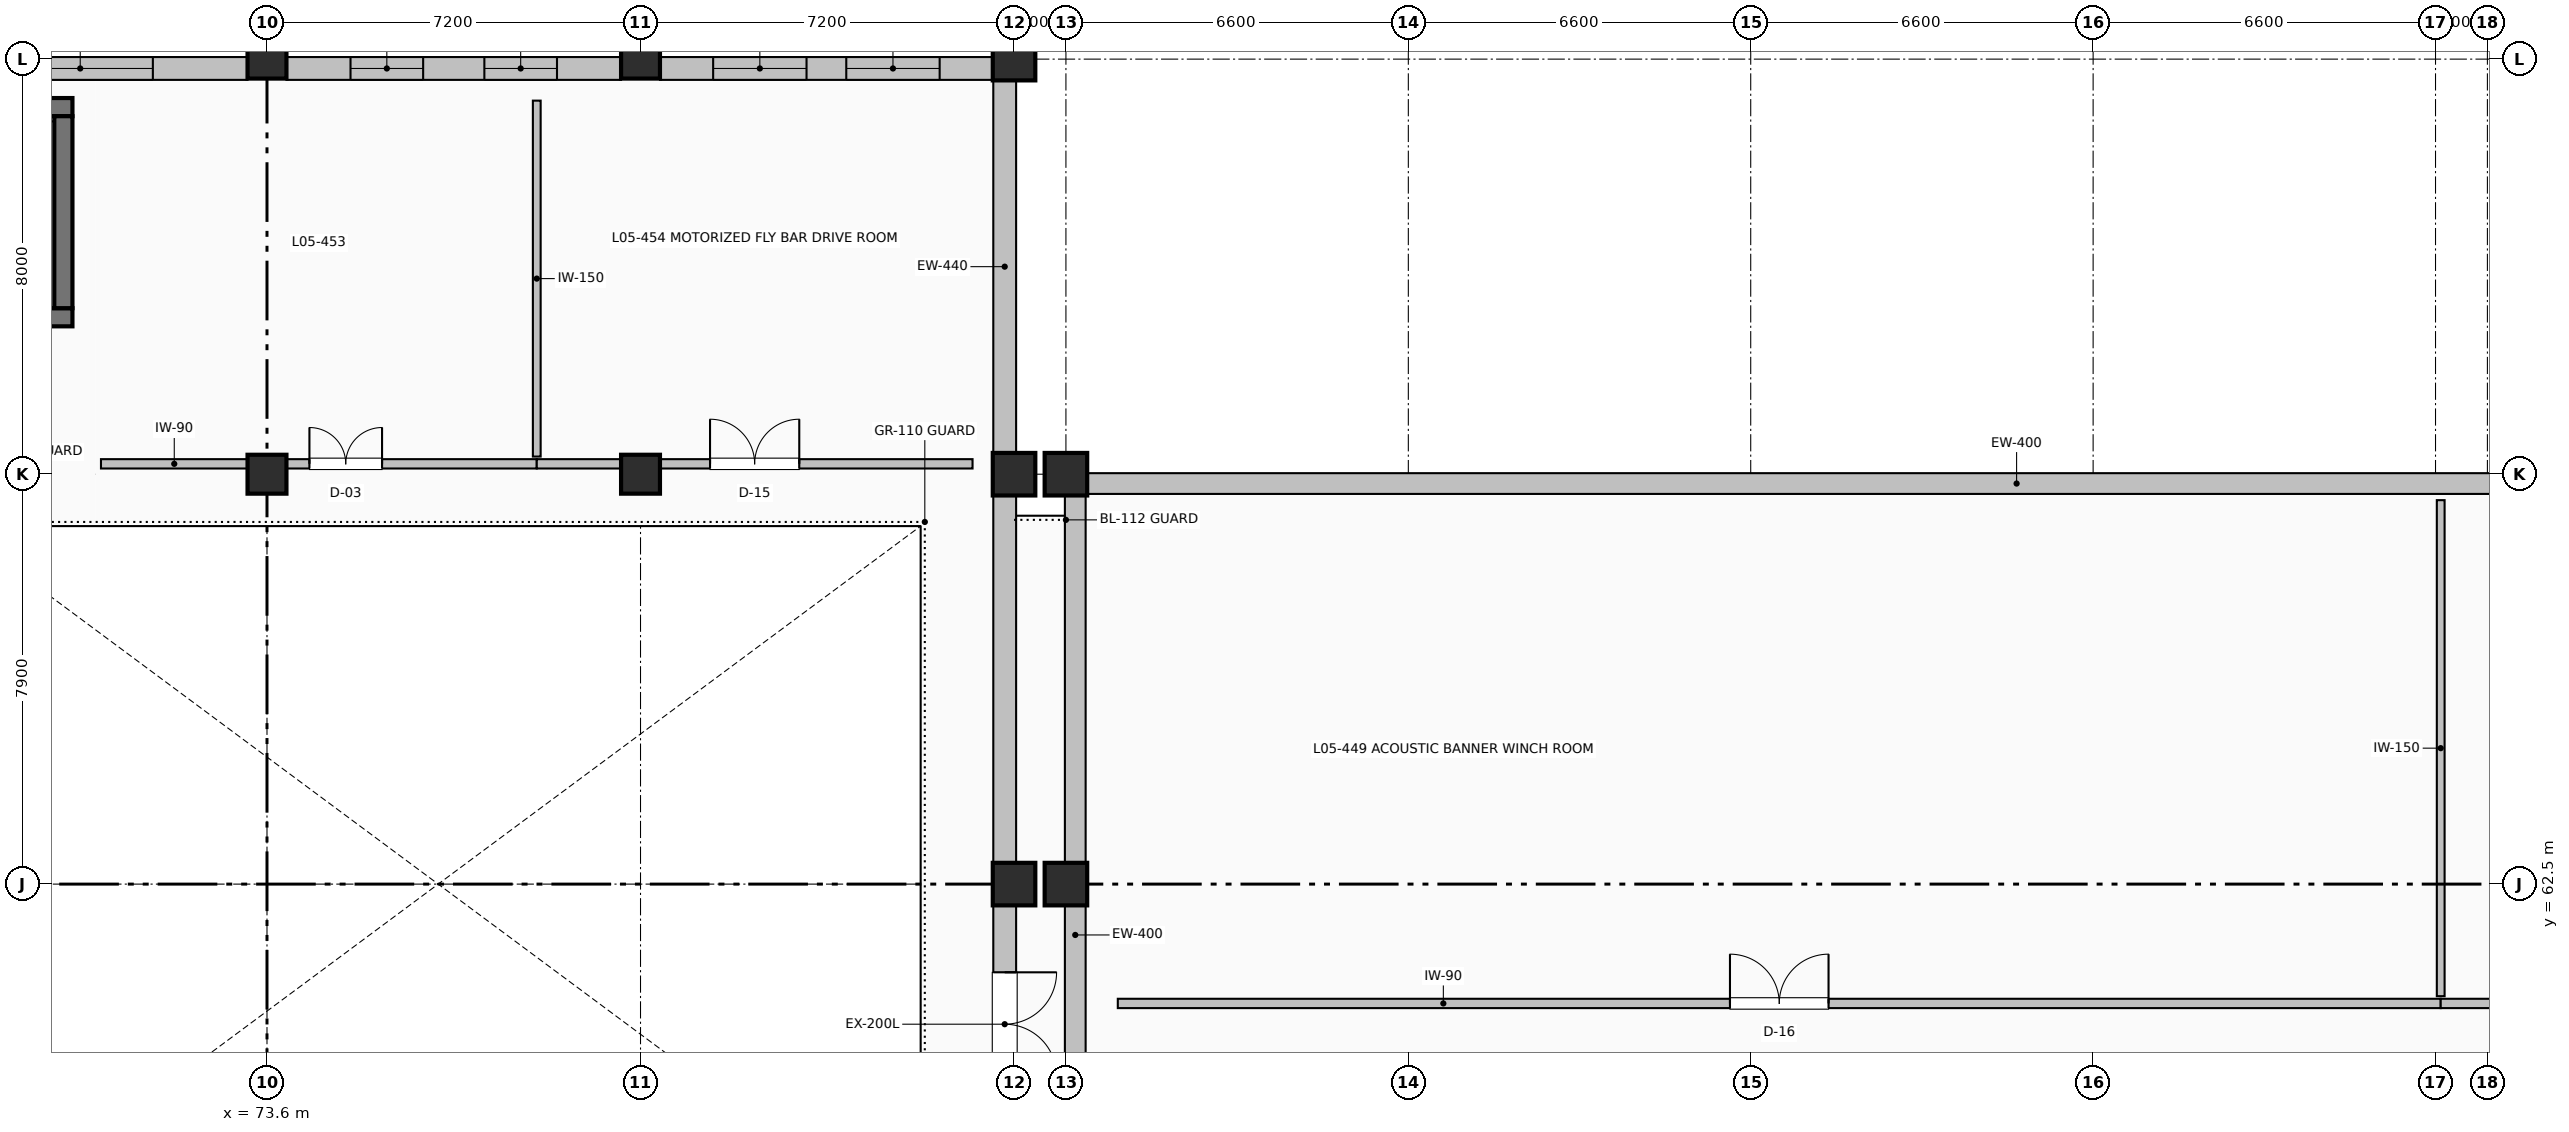
"""IFC4 building model, lengths in metres.
Left out: names, types, materials, properties, quantities, classifications, styles, units other than length and angle.
Written with IfcOpenShell. Run it as: python <this file> out.ifc"""

import sys

from ifc_helpers import new_model, si_unit, direction, frame, frame_2d, origin, origin_2d, place, context, subcontext, project, spatial, rectangle, extrude, element, fill, save


model = new_model("IFC4")
c1 = context("Model", 3, precision=1e-05, world=origin(), true_north=direction((0.0, 1.0)))
c2 = subcontext(c1, "Body", "Model", "MODEL_VIEW")
j1 = project(units=[si_unit("LENGTHUNIT", "METRE"), si_unit("PLANEANGLEUNIT", "RADIAN")], contexts=[c1])
p1 = place(None, origin())
s1 = spatial("IfcSite", under=j1, at=p1, CompositionType="ELEMENT")
p2 = place(p1, origin())
s2 = spatial("IfcBuilding", under=s1, at=p2, CompositionType="ELEMENT")
p3 = place(p2, frame((0.0, 0.0, 24.0)))
s3 = spatial("IfcBuildingStorey", under=s2, at=p3, CompositionType="ELEMENT", Elevation=24.0)
for number, where, z_axis, x_axis in (
    (1, (89.0, 62.5, 0.0), (0.0, 0.0, 1.0), (1.0, 0.0, 0.0)),
    (2, (89.0, 70.4, 0.0), (0.0, 0.0, 1.0), (1.0, 0.0, 0.0)),
):
    element("IfcColumn", number, at=place(p3, frame(where, z_axis=z_axis, x_axis=x_axis)), inside=s3, PredefinedType="COLUMN", context=c2, shape_type="SweptSolid", body=[
        extrude(rectangle(XDim=0.82, YDim=0.82, at=origin_2d()), origin(), (0.0, 0.0, 1.0), 4.5),
    ])
for number, where, z_axis, x_axis in (
    (3, (73.6, 70.4, 0.0), (0.0, 0.0, 1.0), (1.0, 0.0, 0.0)),
    (4, (73.6, 78.4, 0.0), (0.0, 0.0, 1.0), (1.0, 0.0, 0.0)),
    (5, (80.8, 70.4, 0.0), (0.0, 0.0, 1.0), (1.0, 0.0, 0.0)),
    (6, (80.8, 78.4, 0.0), (0.0, 0.0, 1.0), (1.0, 0.0, 0.0)),
):
    element("IfcColumn", number, at=place(p3, frame(where, z_axis=z_axis, x_axis=x_axis)), inside=s3, PredefinedType="COLUMN", context=c2, shape_type="SweptSolid", body=[
        extrude(rectangle(XDim=0.75, YDim=0.75, at=origin_2d()), origin(), (0.0, 0.0, 1.0), 4.5),
    ])
for number, where, z_axis, x_axis in (
    (7, (88.0, 62.5, 0.0), (0.0, 0.0, 1.0), (1.0, 0.0, 0.0)),
    (8, (88.0, 70.4, 0.0), (0.0, 0.0, 1.0), (1.0, 0.0, 0.0)),
    (9, (88.0, 78.4, 0.0), (0.0, 0.0, 1.0), (1.0, 0.0, 0.0)),
):
    element("IfcColumn", number, at=place(p3, frame(where, z_axis=z_axis, x_axis=x_axis)), inside=s3, PredefinedType="COLUMN", context=c2, shape_type="SweptSolid", body=[
        extrude(rectangle(XDim=0.82, YDim=0.82, at=origin_2d()), origin(), (0.0, 0.0, 1.0), 4.5),
    ])
for number, where, z_axis, x_axis in (
    (10, (61.45, 73.425, 0.0), (0.0, 0.0, 1.0), (1.0, 0.0, 0.0)),
    (11, (69.85, 77.475, 0.0), (0.0, 0.0, 1.0), (-1.0, 0.0, 0.0)),
):
    element("IfcWall", number, at=place(p3, frame(where, z_axis=z_axis, x_axis=x_axis)), inside=s3, PredefinedType="SHEAR", context=c2, shape_type="SweptSolid", body=[
        extrude(rectangle(XDim=8.4, YDim=0.35, at=frame_2d((4.2, 0.0))), origin(), (0.0, 0.0, 1.0), 4.22),
    ])
p4 = place(p3, frame((69.675, 77.3, 0.0), z_axis=(0.0, 0.0, 1.0), x_axis=(0.0, -1.0, 0.0)))
e12 = element("IfcWall", 12, at=p4, inside=s3, PredefinedType="SHEAR", context=c2, shape_type="SweptSolid", body=[
    extrude(rectangle(XDim=3.7, YDim=0.35, at=frame_2d((1.85, 0.0))), origin(), (0.0, 0.0, 1.0), 4.22),
])
p5 = place(p3, frame((89.41, 70.22, 0.0), z_axis=(0.0, 0.0, 1.0), x_axis=(1.0, 0.0, 0.0)))
e13 = element("IfcWall", 13, at=p5, inside=s3, PredefinedType="SOLIDWALL", context=c2, shape_type="SweptSolid", body=[
    extrude(rectangle(XDim=52.39, YDim=0.4, at=frame_2d((26.195, 0.0))), origin(), (0.0, 0.0, 1.0), 4.2),
])
p6 = place(p3, frame((89.18, 55.01, 0.0), z_axis=(0.0, 0.0, 1.0), x_axis=(0.0, 1.0, 0.0)))
e14 = element("IfcWall", 14, at=p6, inside=s3, PredefinedType="SOLIDWALL", context=c2, shape_type="SweptSolid", body=[
    extrude(rectangle(XDim=7.08, YDim=0.4, at=frame_2d((3.54, 0.0))), origin(), (0.0, 0.0, 1.0), 4.2),
])
p7 = place(p6, frame((1.49, 0.0, 0.0)))
e15 = element("IfcOpeningElement", 15, at=p7, cuts=e14, PredefinedType="OPENING", context=c2, shape_type="SweptSolid", body=[
    extrude(rectangle(XDim=2.0, YDim=2.1, at=frame_2d((1.0, 1.05))), frame((0.0, 0.21, 0.0), z_axis=(0.0, -1.0, 0.0), x_axis=(1.0, 0.0, 0.0)), (0.0, 0.0, 1.0), 0.42),
])
p8 = place(p3, frame((89.18, 62.91, 0.0), z_axis=(0.0, 0.0, 1.0), x_axis=(0.0, 1.0, 0.0)))
e16 = element("IfcWall", 16, at=p8, inside=s3, PredefinedType="SOLIDWALL", context=c2, shape_type="SweptSolid", body=[
    extrude(rectangle(XDim=7.08, YDim=0.4, at=frame_2d((3.54, 0.0))), origin(), (0.0, 0.0, 1.0), 4.2),
])
p9 = place(p3, frame((87.82, 77.99, 0.0), z_axis=(0.0, 0.0, 1.0), x_axis=(0.0, -1.0, 0.0)))
e17 = element("IfcWall", 17, at=p9, inside=s3, PredefinedType="SOLIDWALL", context=c2, shape_type="SweptSolid", body=[
    extrude(rectangle(XDim=7.18, YDim=0.44, at=frame_2d((3.59, 0.0))), origin(), (0.0, 0.0, 1.0), 3.462),
])
p10 = place(p3, frame((87.82, 69.99, 0.0), z_axis=(0.0, 0.0, 1.0), x_axis=(0.0, -1.0, 0.0)))
e18 = element("IfcWall", 18, at=p10, inside=s3, PredefinedType="SOLIDWALL", context=c2, shape_type="SweptSolid", body=[
    extrude(rectangle(XDim=7.08, YDim=0.44, at=frame_2d((3.54, 0.0))), origin(), (0.0, 0.0, 1.0), 3.462),
])
p11 = place(p3, frame((87.82, 62.09, 0.0), z_axis=(0.0, 0.0, 1.0), x_axis=(0.0, -1.0, 0.0)))
e19 = element("IfcWall", 19, at=p11, inside=s3, PredefinedType="SOLIDWALL", context=c2, shape_type="SweptSolid", body=[
    extrude(rectangle(XDim=7.08, YDim=0.44, at=frame_2d((3.54, 0.0))), origin(), (0.0, 0.0, 1.0), 3.462),
])
p12 = place(p11, frame((1.29, 0.0, 0.0)))
e20 = element("IfcOpeningElement", 20, at=p12, cuts=e19, PredefinedType="OPENING", context=c2, shape_type="SweptSolid", body=[
    extrude(rectangle(XDim=2.0, YDim=2.1, at=frame_2d((1.0, 1.05))), frame((0.0, 0.23, 0.0), z_axis=(0.0, -1.0, 0.0), x_axis=(1.0, 0.0, 0.0)), (0.0, 0.0, 1.0), 0.46),
])
p13 = place(p3, frame((66.775, 78.22, 0.0), z_axis=(0.0, 0.0, 1.0), x_axis=(1.0, 0.0, 0.0)))
e21 = element("IfcWall", 21, at=p13, inside=s3, PredefinedType="SOLIDWALL", context=c2, shape_type="SweptSolid", body=[
    extrude(rectangle(XDim=6.45, YDim=0.44, at=frame_2d((3.225, 0.0))), origin(), (0.0, 0.0, 1.0), 3.462),
])
p14 = place(p13, frame((1.825, 0.0, 1.05)))
e22 = element("IfcOpeningElement", 22, at=p14, cuts=e21, PredefinedType="OPENING", context=c2, shape_type="SweptSolid", body=[
    extrude(rectangle(XDim=2.8, YDim=1.35, at=frame_2d((1.4, 0.675))), frame((0.0, 0.23, 0.0), z_axis=(0.0, -1.0, 0.0), x_axis=(1.0, 0.0, 0.0)), (0.0, 0.0, 1.0), 0.46),
])
p15 = place(p3, frame((73.975, 78.22, 0.0), z_axis=(0.0, 0.0, 1.0), x_axis=(1.0, 0.0, 0.0)))
e23 = element("IfcWall", 23, at=p15, inside=s3, PredefinedType="SOLIDWALL", context=c2, shape_type="SweptSolid", body=[
    extrude(rectangle(XDim=6.45, YDim=0.44, at=frame_2d((3.225, 0.0))), origin(), (0.0, 0.0, 1.0), 3.462),
])
p16 = place(p15, frame((1.235, 0.0, 1.0)))
e24 = element("IfcOpeningElement", 24, at=p16, cuts=e23, PredefinedType="OPENING", context=c2, shape_type="SweptSolid", body=[
    extrude(rectangle(XDim=1.4, YDim=1.2, at=frame_2d((0.7, 0.6))), frame((0.0, 0.23, 0.0), z_axis=(0.0, -1.0, 0.0), x_axis=(1.0, 0.0, 0.0)), (0.0, 0.0, 1.0), 0.46),
])
p17 = place(p15, frame((3.815, 0.0, 1.0)))
e25 = element("IfcOpeningElement", 25, at=p17, cuts=e23, PredefinedType="OPENING", context=c2, shape_type="SweptSolid", body=[
    extrude(rectangle(XDim=1.4, YDim=1.2, at=frame_2d((0.7, 0.6))), frame((0.0, 0.23, 0.0), z_axis=(0.0, -1.0, 0.0), x_axis=(1.0, 0.0, 0.0)), (0.0, 0.0, 1.0), 0.46),
])
p18 = place(p3, frame((81.175, 78.22, 0.0), z_axis=(0.0, 0.0, 1.0), x_axis=(1.0, 0.0, 0.0)))
e26 = element("IfcWall", 26, at=p18, inside=s3, PredefinedType="SOLIDWALL", context=c2, shape_type="SweptSolid", body=[
    extrude(rectangle(XDim=6.415, YDim=0.44, at=frame_2d((3.208, 0.0))), origin(), (0.0, 0.0, 1.0), 3.462),
])
p19 = place(p18, frame((1.025, 0.0, 1.05)))
e27 = element("IfcOpeningElement", 27, at=p19, cuts=e26, PredefinedType="OPENING", context=c2, shape_type="SweptSolid", body=[
    extrude(rectangle(XDim=1.8, YDim=1.25, at=frame_2d((0.9, 0.625))), frame((0.0, 0.23, 0.0), z_axis=(0.0, -1.0, 0.0), x_axis=(1.0, 0.0, 0.0)), (0.0, 0.0, 1.0), 0.46),
])
p20 = place(p18, frame((3.591, 0.0, 1.05)))
e28 = element("IfcOpeningElement", 28, at=p20, cuts=e26, PredefinedType="OPENING", context=c2, shape_type="SweptSolid", body=[
    extrude(rectangle(XDim=1.8, YDim=1.25, at=frame_2d((0.9, 0.625))), frame((0.0, 0.23, 0.0), z_axis=(0.0, -1.0, 0.0), x_axis=(1.0, 0.0, 0.0)), (0.0, 0.0, 1.0), 0.46),
])
p21 = place(p3, frame((90.0, 60.2, 0.0), z_axis=(0.0, 0.0, 1.0), x_axis=(1.0, 0.0, 0.0)))
e29 = element("IfcWall", 29, at=p21, inside=s3, PredefinedType="PARTITIONING", context=c2, shape_type="SweptSolid", body=[
    extrude(rectangle(XDim=25.5, YDim=0.18, at=frame_2d((12.75, 0.0))), origin(), (0.0, 0.0, 1.0), 4.192),
])
p22 = place(p21, frame((11.8, 0.0, 0.0)))
e30 = element("IfcOpeningElement", 30, at=p22, cuts=e29, PredefinedType="OPENING", context=c2, shape_type="SweptSolid", body=[
    extrude(rectangle(XDim=1.9, YDim=2.26, at=frame_2d((0.95, 1.13))), frame((0.0, 0.1, 0.0), z_axis=(0.0, -1.0, 0.0), x_axis=(1.0, 0.0, 0.0)), (0.0, 0.0, 1.0), 0.2),
])
p23 = place(p3, frame((115.5, 60.34, 0.0), z_axis=(0.0, 0.0, 1.0), x_axis=(0.0, 1.0, 0.0)))
e31 = element("IfcWall", 31, at=p23, inside=s3, PredefinedType="PARTITIONING", context=c2, shape_type="SweptSolid", body=[
    extrude(rectangle(XDim=9.56, YDim=0.15, at=frame_2d((4.78, 0.0))), origin(), (0.0, 0.0, 1.0), 4.192),
])
p24 = place(p3, frame((115.5, 60.2, 0.0), z_axis=(0.0, 0.0, 1.0), x_axis=(1.0, 0.0, 0.0)))
e32 = element("IfcWall", 32, at=p24, inside=s3, PredefinedType="PARTITIONING", context=c2, shape_type="SweptSolid", body=[
    extrude(rectangle(XDim=25.5, YDim=0.18, at=frame_2d((12.75, 0.0))), origin(), (0.0, 0.0, 1.0), 4.192),
])
p25 = place(p24, frame((12.0, 0.0, 0.0)))
e33 = element("IfcOpeningElement", 33, at=p25, cuts=e32, PredefinedType="OPENING", context=c2, shape_type="SweptSolid", body=[
    extrude(rectangle(XDim=1.5, YDim=2.15, at=frame_2d((0.75, 1.075))), frame((0.0, 0.1, 0.0), z_axis=(0.0, -1.0, 0.0), x_axis=(1.0, 0.0, 0.0)), (0.0, 0.0, 1.0), 0.2),
])
p26 = place(p3, frame((70.4, 70.6, 0.0), z_axis=(0.0, 0.0, 1.0), x_axis=(1.0, 0.0, 0.0)))
e34 = element("IfcWall", 34, at=p26, inside=s3, PredefinedType="PARTITIONING", context=c2, shape_type="SweptSolid", body=[
    extrude(rectangle(XDim=2.825, YDim=0.18, at=frame_2d((1.413, 0.0))), origin(), (0.0, 0.0, 1.0), 3.462),
])
p27 = place(p3, frame((73.975, 70.6, 0.0), z_axis=(0.0, 0.0, 1.0), x_axis=(1.0, 0.0, 0.0)))
e35 = element("IfcWall", 35, at=p27, inside=s3, PredefinedType="PARTITIONING", context=c2, shape_type="SweptSolid", body=[
    extrude(rectangle(XDim=4.825, YDim=0.18, at=frame_2d((2.413, 0.0))), origin(), (0.0, 0.0, 1.0), 3.462),
])
p28 = place(p27, frame((0.443, 0.0, 0.0)))
e36 = element("IfcOpeningElement", 36, at=p28, cuts=e35, PredefinedType="OPENING", context=c2, shape_type="SweptSolid", body=[
    extrude(rectangle(XDim=1.4, YDim=2.12, at=frame_2d((0.7, 1.06))), frame((0.0, 0.1, 0.0), z_axis=(0.0, -1.0, 0.0), x_axis=(1.0, 0.0, 0.0)), (0.0, 0.0, 1.0), 0.2),
])
p29 = place(p3, frame((78.8, 70.74, 0.0), z_axis=(0.0, 0.0, 1.0), x_axis=(0.0, 1.0, 0.0)))
e37 = element("IfcWall", 37, at=p29, inside=s3, PredefinedType="PARTITIONING", context=c2, shape_type="SweptSolid", body=[
    extrude(rectangle(XDim=6.86, YDim=0.15, at=frame_2d((3.43, 0.0))), origin(), (0.0, 0.0, 1.0), 4.192),
])
p30 = place(p3, frame((78.8, 70.6, 0.0), z_axis=(0.0, 0.0, 1.0), x_axis=(1.0, 0.0, 0.0)))
e38 = element("IfcWall", 38, at=p30, inside=s3, PredefinedType="PARTITIONING", context=c2, shape_type="SweptSolid", body=[
    extrude(rectangle(XDim=1.625, YDim=0.18, at=frame_2d((0.812, 0.0))), origin(), (0.0, 0.0, 1.0), 3.462),
])
p31 = place(p3, frame((81.175, 70.6, 0.0), z_axis=(0.0, 0.0, 1.0), x_axis=(1.0, 0.0, 0.0)))
e39 = element("IfcWall", 39, at=p31, inside=s3, PredefinedType="PARTITIONING", context=c2, shape_type="SweptSolid", body=[
    extrude(rectangle(XDim=6.025, YDim=0.18, at=frame_2d((3.012, 0.0))), origin(), (0.0, 0.0, 1.0), 3.462),
])
p32 = place(p31, frame((0.965, 0.0, 0.0)))
e40 = element("IfcOpeningElement", 40, at=p32, cuts=e39, PredefinedType="OPENING", context=c2, shape_type="SweptSolid", body=[
    extrude(rectangle(XDim=1.72, YDim=2.22, at=frame_2d((0.86, 1.11))), frame((0.0, 0.1, 0.0), z_axis=(0.0, -1.0, 0.0), x_axis=(1.0, 0.0, 0.0)), (0.0, 0.0, 1.0), 0.2),
])
p33 = place(p14, origin())
e41 = element("IfcWindow", 41, at=p33, inside=s3, PartitioningType="SINGLE_PANEL", PredefinedType="WINDOW", context=c2, shape_type="SweptSolid", body=[
    extrude(rectangle(XDim=2.8, YDim=1.35, at=frame_2d((1.4, 0.675))), frame((0.0, 0.03, 0.0), z_axis=(0.0, -1.0, 0.0), x_axis=(1.0, 0.0, 0.0)), (0.0, 0.0, 1.0), 0.06),
])
fill(e22, e41)
p34 = place(p16, origin())
e42 = element("IfcWindow", 42, at=p34, inside=s3, PartitioningType="SINGLE_PANEL", PredefinedType="WINDOW", context=c2, shape_type="SweptSolid", body=[
    extrude(rectangle(XDim=1.4, YDim=1.2, at=frame_2d((0.7, 0.6))), frame((0.0, 0.03, 0.0), z_axis=(0.0, -1.0, 0.0), x_axis=(1.0, 0.0, 0.0)), (0.0, 0.0, 1.0), 0.06),
])
fill(e24, e42)
p35 = place(p17, origin())
e43 = element("IfcWindow", 43, at=p35, inside=s3, PartitioningType="SINGLE_PANEL", PredefinedType="WINDOW", context=c2, shape_type="SweptSolid", body=[
    extrude(rectangle(XDim=1.4, YDim=1.2, at=frame_2d((0.7, 0.6))), frame((0.0, 0.03, 0.0), z_axis=(0.0, -1.0, 0.0), x_axis=(1.0, 0.0, 0.0)), (0.0, 0.0, 1.0), 0.06),
])
fill(e25, e43)
p36 = place(p19, origin())
e44 = element("IfcWindow", 44, at=p36, inside=s3, PartitioningType="SINGLE_PANEL", PredefinedType="WINDOW", context=c2, shape_type="SweptSolid", body=[
    extrude(rectangle(XDim=1.8, YDim=1.25, at=frame_2d((0.9, 0.625))), frame((0.0, 0.03, 0.0), z_axis=(0.0, -1.0, 0.0), x_axis=(1.0, 0.0, 0.0)), (0.0, 0.0, 1.0), 0.06),
])
fill(e27, e44)
p37 = place(p20, origin())
e45 = element("IfcWindow", 45, at=p37, inside=s3, PartitioningType="SINGLE_PANEL", PredefinedType="WINDOW", context=c2, shape_type="SweptSolid", body=[
    extrude(rectangle(XDim=1.8, YDim=1.25, at=frame_2d((0.9, 0.625))), frame((0.0, 0.03, 0.0), z_axis=(0.0, -1.0, 0.0), x_axis=(1.0, 0.0, 0.0)), (0.0, 0.0, 1.0), 0.06),
])
fill(e28, e45)
p38 = place(p12, origin())
e46 = element("IfcDoor", 46, at=p38, inside=s3, OperationType="DOUBLE_DOOR_SINGLE_SWING", PredefinedType="DOOR", context=c2, shape_type="SweptSolid", body=[
    extrude(rectangle(XDim=2.0, YDim=2.1, at=frame_2d((1.0, 1.05))), frame((0.0, 0.025, 0.0), z_axis=(0.0, -1.0, 0.0), x_axis=(1.0, 0.0, 0.0)), (0.0, 0.0, 1.0), 0.05),
])
fill(e20, e46)
p39 = place(p22, origin())
e47 = element("IfcDoor", 47, at=p39, inside=s3, OperationType="DOUBLE_DOOR_SINGLE_SWING", PredefinedType="DOOR", context=c2, shape_type="SweptSolid", body=[
    extrude(rectangle(XDim=1.9, YDim=2.26, at=frame_2d((0.95, 1.13))), frame((0.0, 0.025, 0.0), z_axis=(0.0, -1.0, 0.0), x_axis=(1.0, 0.0, 0.0)), (0.0, 0.0, 1.0), 0.05),
])
fill(e30, e47)
p40 = place(p28, origin())
e48 = element("IfcDoor", 48, at=p40, inside=s3, OperationType="DOUBLE_DOOR_SINGLE_SWING", PredefinedType="DOOR", context=c2, shape_type="SweptSolid", body=[
    extrude(rectangle(XDim=1.4, YDim=2.12, at=frame_2d((0.7, 1.06))), frame((0.0, 0.025, 0.0), z_axis=(0.0, -1.0, 0.0), x_axis=(1.0, 0.0, 0.0)), (0.0, 0.0, 1.0), 0.05),
])
fill(e36, e48)
p41 = place(p32, origin())
e49 = element("IfcDoor", 49, at=p41, inside=s3, OperationType="DOUBLE_DOOR_SINGLE_SWING", PredefinedType="DOOR", context=c2, shape_type="SweptSolid", body=[
    extrude(rectangle(XDim=1.72, YDim=2.22, at=frame_2d((0.86, 1.11))), frame((0.0, 0.025, 0.0), z_axis=(0.0, -1.0, 0.0), x_axis=(1.0, 0.0, 0.0)), (0.0, 0.0, 1.0), 0.05),
])
fill(e40, e49)
save(model, sys.argv[1])
